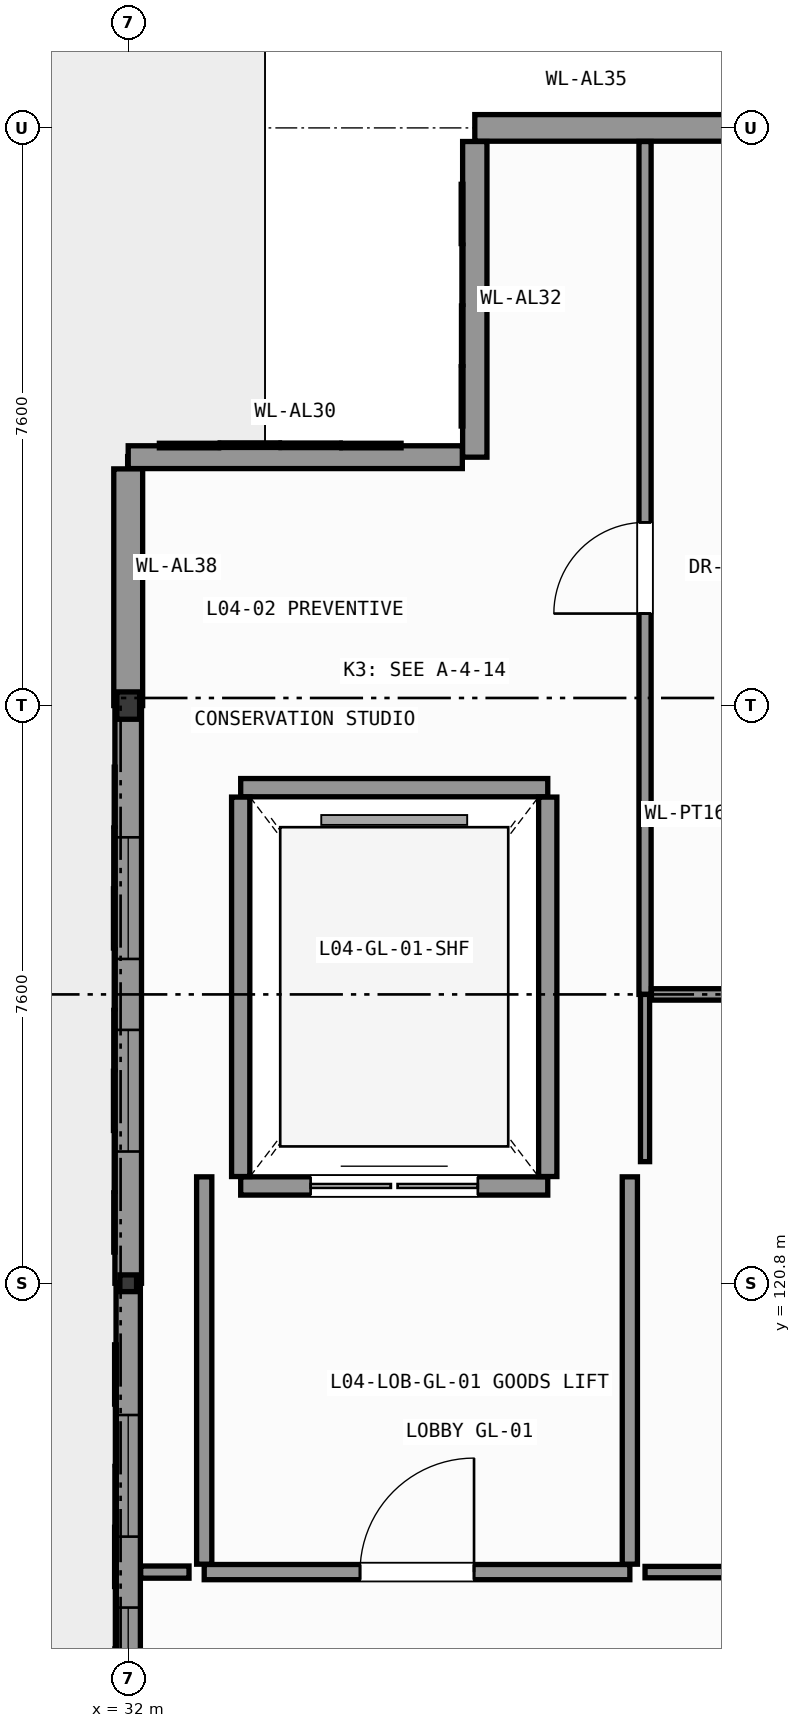
"""IFC4 building model, lengths in metres.
Left out: names, types, materials, properties, quantities, classifications, styles, units other than length and angle.
Written with IfcOpenShell. Run it as: python <this file> out.ifc"""

import sys

from ifc_helpers import new_model, si_unit, direction, frame, frame_2d, origin, origin_2d, place, context, subcontext, project, spatial, rectangle, hollow_rectangle, i_section, extrude, element, fill, save


model = new_model("IFC4")
c1 = context("Model", 3, precision=1e-05, world=origin(), true_north=direction((0.0, 1.0)))
c2 = subcontext(c1, "Body", "Model", "MODEL_VIEW")
j1 = project(units=[si_unit("LENGTHUNIT", "METRE"), si_unit("PLANEANGLEUNIT", "RADIAN")], contexts=[c1])
p1 = place(None, origin())
s1 = spatial("IfcSite", under=j1, at=p1, CompositionType="ELEMENT")
p2 = place(p1, origin())
s2 = spatial("IfcBuilding", under=s1, at=p2, CompositionType="ELEMENT")
p3 = place(p2, frame((0.0, 0.0, 18.0)))
s3 = spatial("IfcBuildingStorey", under=s2, at=p3, CompositionType="ELEMENT", Elevation=18.0)
p4 = place(p3, frame((32.0, 120.8, 0.0), z_axis=(0.0, 0.0, 1.0), x_axis=(1.0, 0.0, 0.0)))
e1 = element("IfcColumn", 1, at=p4, inside=s3, PredefinedType="COLUMN", context=c2, shape_type="SweptSolid", body=[
    extrude(hollow_rectangle(XDim=0.22, YDim=0.22, WallThickness=0.012, InnerFilletRadius=0.012, OuterFilletRadius=0.024, at=origin_2d()), origin(), (0.0, 0.0, 1.0), 4.2),
])
p5 = place(p3, frame((32.0, 128.4, 0.0), z_axis=(0.0, 0.0, 1.0), x_axis=(1.0, 0.0, 0.0)))
e2 = element("IfcColumn", 2, at=p5, inside=s3, PredefinedType="COLUMN", context=c2, shape_type="SweptSolid", body=[
    extrude(i_section(OverallWidth=0.3, OverallDepth=0.36, WebThickness=0.012, FlangeThickness=0.022, FilletRadius=0.027, at=origin_2d()), origin(), (0.0, 0.0, 1.0), 4.2),
])
p6 = place(p3, frame((36.56, 136.0, 0.0), z_axis=(0.0, 0.0, 1.0), x_axis=(1.0, 0.0, 0.0)))
e3 = element("IfcWall", 3, at=p6, inside=s3, PredefinedType="SOLIDWALL", context=c2, shape_type="SweptSolid", body=[
    extrude(rectangle(XDim=3.44, YDim=0.35, at=frame_2d((1.72, 0.0))), origin(), (0.0, 0.0, 1.0), 3.98),
])
p7 = place(p3, frame((36.56, 131.668, 0.0), z_axis=(0.0, 0.0, 1.0), x_axis=(0.0, 1.0, 0.0)))
e4 = element("IfcWall", 4, at=p7, inside=s3, PredefinedType="SOLIDWALL", context=c2, shape_type="SweptSolid", body=[
    extrude(rectangle(XDim=4.153, YDim=0.32, at=frame_2d((2.077, 0.0))), origin(), (0.0, 0.0, 1.0), 3.98),
])
p8 = place(p3, frame((32.0, 131.668, 0.0), z_axis=(0.0, 0.0, 1.0), x_axis=(1.0, 0.0, 0.0)))
e5 = element("IfcWall", 5, at=p8, inside=s3, PredefinedType="SOLIDWALL", context=c2, shape_type="SweptSolid", body=[
    extrude(rectangle(XDim=4.396, YDim=0.3, at=frame_2d((2.198, 0.0))), origin(), (0.0, 0.0, 1.0), 3.98),
])
p9 = place(p3, frame((32.0, 128.4, 0.0), z_axis=(0.0, 0.0, 1.0), x_axis=(0.0, 1.0, 0.0)))
e6 = element("IfcWall", 6, at=p9, inside=s3, PredefinedType="SOLIDWALL", context=c2, shape_type="SweptSolid", body=[
    extrude(rectangle(XDim=3.114, YDim=0.38, at=frame_2d((1.557, 0.0))), origin(), (0.0, 0.0, 1.0), 3.98),
])
p10 = place(p3, frame((32.0, 120.8, 0.0), z_axis=(0.0, 0.0, 1.0), x_axis=(0.0, 1.0, 0.0)))
e7 = element("IfcWall", 7, at=p10, inside=s3, PredefinedType="SOLIDWALL", context=c2, shape_type="SweptSolid", body=[
    extrude(rectangle(XDim=7.6, YDim=0.35, at=frame_2d((3.8, 0.0))), origin(), (0.0, 0.0, 1.0), 3.485),
])
p11 = place(p10, frame((1.733, 0.0, 0.95)))
e8 = element("IfcOpeningElement", 8, at=p11, cuts=e7, PredefinedType="OPENING", context=c2, shape_type="SweptSolid", body=[
    extrude(rectangle(XDim=1.6, YDim=2.13, at=frame_2d((0.8, 1.065))), frame((0.0, 0.185, 0.0), z_axis=(0.0, -1.0, 0.0), x_axis=(1.0, 0.0, 0.0)), (0.0, 0.0, 1.0), 0.37),
])
p12 = place(p10, frame((4.267, 0.0, 0.95)))
e9 = element("IfcOpeningElement", 9, at=p12, cuts=e7, PredefinedType="OPENING", context=c2, shape_type="SweptSolid", body=[
    extrude(rectangle(XDim=1.6, YDim=2.13, at=frame_2d((0.8, 1.065))), frame((0.0, 0.185, 0.0), z_axis=(0.0, -1.0, 0.0), x_axis=(1.0, 0.0, 0.0)), (0.0, 0.0, 1.0), 0.37),
])
p13 = place(p3, frame((32.0, 113.2, 0.0), z_axis=(0.0, 0.0, 1.0), x_axis=(0.0, 1.0, 0.0)))
e10 = element("IfcWall", 10, at=p13, inside=s3, PredefinedType="SOLIDWALL", context=c2, shape_type="SweptSolid", body=[
    extrude(rectangle(XDim=7.6, YDim=0.32, at=frame_2d((3.8, 0.0))), origin(), (0.0, 0.0, 1.0), 3.485),
])
p14 = place(p13, frame((1.733, 0.0, 0.95)))
e11 = element("IfcOpeningElement", 11, at=p14, cuts=e10, PredefinedType="OPENING", context=c2, shape_type="SweptSolid", body=[
    extrude(rectangle(XDim=1.6, YDim=2.13, at=frame_2d((0.8, 1.065))), frame((0.0, 0.17, 0.0), z_axis=(0.0, -1.0, 0.0), x_axis=(1.0, 0.0, 0.0)), (0.0, 0.0, 1.0), 0.34),
])
p15 = place(p13, frame((4.267, 0.0, 0.95)))
e12 = element("IfcOpeningElement", 12, at=p15, cuts=e10, PredefinedType="OPENING", context=c2, shape_type="SweptSolid", body=[
    extrude(rectangle(XDim=1.6, YDim=2.13, at=frame_2d((0.8, 1.065))), frame((0.0, 0.17, 0.0), z_axis=(0.0, -1.0, 0.0), x_axis=(1.0, 0.0, 0.0)), (0.0, 0.0, 1.0), 0.34),
])
p16 = place(p3, frame((33.48, 122.08, 0.0), z_axis=(0.0, 0.0, 1.0), x_axis=(1.0, 0.0, 0.0)))
e13 = element("IfcWall", 13, at=p16, inside=s3, PredefinedType="SHEAR", context=c2, shape_type="SweptSolid", body=[
    extrude(rectangle(XDim=4.04, YDim=0.24, at=frame_2d((2.02, 0.0))), origin(), (0.0, 0.0, 1.0), 3.98),
])
p17 = place(p16, frame((0.92, 0.0, 0.0)))
e14 = element("IfcOpeningElement", 14, at=p17, cuts=e13, PredefinedType="OPENING", context=c2, shape_type="SweptSolid", body=[
    extrude(rectangle(XDim=2.2, YDim=2.6, at=frame_2d((1.1, 1.3))), frame((0.0, 0.13, 0.0), z_axis=(0.0, -1.0, 0.0), x_axis=(1.0, 0.0, 0.0)), (0.0, 0.0, 1.0), 0.26),
])
p18 = place(p3, frame((33.48, 127.32, 0.0), z_axis=(0.0, 0.0, 1.0), x_axis=(1.0, 0.0, 0.0)))
e15 = element("IfcWall", 15, at=p18, inside=s3, PredefinedType="SHEAR", context=c2, shape_type="SweptSolid", body=[
    extrude(rectangle(XDim=4.04, YDim=0.24, at=frame_2d((2.02, 0.0))), origin(), (0.0, 0.0, 1.0), 3.98),
])
for number, where, z_axis, x_axis in (
    (16, (33.48, 122.204, 0.0), (0.0, 0.0, 1.0), (0.0, 1.0, 0.0)),
    (17, (37.52, 122.204, 0.0), (0.0, 0.0, 1.0), (0.0, 1.0, 0.0)),
):
    element("IfcWall", number, at=place(p3, frame(where, z_axis=z_axis, x_axis=x_axis)), inside=s3, PredefinedType="SHEAR", context=c2, shape_type="SweptSolid", body=[
        extrude(rectangle(XDim=4.992, YDim=0.24, at=frame_2d((2.496, 0.0))), origin(), (0.0, 0.0, 1.0), 3.98),
    ])
p19 = place(p3, frame((33.0, 117.0, 0.0), z_axis=(0.0, 0.0, 1.0), x_axis=(1.0, 0.0, 0.0)))
e18 = element("IfcWall", 18, at=p19, inside=s3, PredefinedType="PARTITIONING", context=c2, shape_type="SweptSolid", body=[
    extrude(rectangle(XDim=5.6, YDim=0.2, at=frame_2d((2.8, 0.0))), origin(), (0.0, 0.0, 1.0), 3.98),
])
p20 = place(p19, frame((2.05, 0.0, 0.0)))
e19 = element("IfcOpeningElement", 19, at=p20, cuts=e18, PredefinedType="OPENING", context=c2, shape_type="SweptSolid", body=[
    extrude(rectangle(XDim=1.5, YDim=2.2, at=frame_2d((0.75, 1.1))), frame((0.0, 0.11, 0.0), z_axis=(0.0, -1.0, 0.0), x_axis=(1.0, 0.0, 0.0)), (0.0, 0.0, 1.0), 0.22),
])
for number, where, z_axis, x_axis in (
    (20, (33.0, 117.104, 0.0), (0.0, 0.0, 1.0), (0.0, 1.0, 0.0)),
    (21, (38.6, 117.104, 0.0), (0.0, 0.0, 1.0), (0.0, 1.0, 0.0)),
):
    element("IfcWall", number, at=place(p3, frame(where, z_axis=z_axis, x_axis=x_axis)), inside=s3, PredefinedType="PARTITIONING", context=c2, shape_type="SweptSolid", body=[
        extrude(rectangle(XDim=5.096, YDim=0.2, at=frame_2d((2.548, 0.0))), origin(), (0.0, 0.0, 1.0), 3.98),
    ])
p21 = place(p3, frame((38.8, 124.6, 0.0), z_axis=(0.0, 0.0, 1.0), x_axis=(0.0, 1.0, 0.0)))
e22 = element("IfcWall", 22, at=p21, inside=s3, PredefinedType="PARTITIONING", context=c2, shape_type="SweptSolid", body=[
    extrude(rectangle(XDim=11.221, YDim=0.16, at=frame_2d((5.61, 0.0))), origin(), (0.0, 0.0, 1.0), 3.98),
])
p22 = place(p21, frame((5.01, 0.0, 0.0)))
e23 = element("IfcOpeningElement", 23, at=p22, cuts=e22, PredefinedType="OPENING", context=c2, shape_type="SweptSolid", body=[
    extrude(rectangle(XDim=1.2, YDim=2.2, at=frame_2d((0.6, 1.1))), frame((0.0, 0.09, 0.0), z_axis=(0.0, -1.0, 0.0), x_axis=(1.0, 0.0, 0.0)), (0.0, 0.0, 1.0), 0.18),
])
p23 = place(p3, frame((38.884, 124.6, 0.0), z_axis=(0.0, 0.0, 1.0), x_axis=(1.0, 0.0, 0.0)))
e24 = element("IfcWall", 24, at=p23, inside=s3, PredefinedType="PARTITIONING", context=c2, shape_type="SweptSolid", body=[
    extrude(rectangle(XDim=16.937, YDim=0.15, at=frame_2d((8.469, 0.0))), origin(), (0.0, 0.0, 1.0), 3.98),
])
p24 = place(p23, frame((7.993, 0.0, 0.0)))
e25 = element("IfcOpeningElement", 25, at=p24, cuts=e24, PredefinedType="OPENING", context=c2, shape_type="SweptSolid", body=[
    extrude(rectangle(XDim=0.95, YDim=2.1, at=frame_2d((0.475, 1.05))), frame((0.0, 0.085, 0.0), z_axis=(0.0, -1.0, 0.0), x_axis=(1.0, 0.0, 0.0)), (0.0, 0.0, 1.0), 0.17),
])
p25 = place(p3, frame((38.8, 122.4, 0.0), z_axis=(0.0, 0.0, 1.0), x_axis=(0.0, 1.0, 0.0)))
e26 = element("IfcWall", 26, at=p25, inside=s3, PredefinedType="PARTITIONING", context=c2, shape_type="SweptSolid", body=[
    extrude(rectangle(XDim=2.2, YDim=0.12, at=frame_2d((1.1, 0.0))), origin(), (0.0, 0.0, 1.0), 3.98),
])
p26 = place(p3, frame((32.164, 117.0, 0.0), z_axis=(0.0, 0.0, 1.0), x_axis=(1.0, 0.0, 0.0)))
e27 = element("IfcWall", 27, at=p26, inside=s3, PredefinedType="PARTITIONING", context=c2, shape_type="SweptSolid", body=[
    extrude(rectangle(XDim=0.636, YDim=0.16, at=frame_2d((0.318, 0.0))), origin(), (0.0, 0.0, 1.0), 3.98),
])
p27 = place(p3, frame((38.8, 117.0, 0.0), z_axis=(0.0, 0.0, 1.0), x_axis=(1.0, 0.0, 0.0)))
e28 = element("IfcWall", 28, at=p27, inside=s3, PredefinedType="PARTITIONING", context=c2, shape_type="SweptSolid", body=[
    extrude(rectangle(XDim=9.446, YDim=0.15, at=frame_2d((4.723, 0.0))), origin(), (0.0, 0.0, 1.0), 3.98),
])
p28 = place(p27, frame((4.198, 0.0, 0.0)))
e29 = element("IfcOpeningElement", 29, at=p28, cuts=e28, PredefinedType="OPENING", context=c2, shape_type="SweptSolid", body=[
    extrude(rectangle(XDim=1.05, YDim=2.2, at=frame_2d((0.525, 1.1))), frame((0.0, 0.085, 0.0), z_axis=(0.0, -1.0, 0.0), x_axis=(1.0, 0.0, 0.0)), (0.0, 0.0, 1.0), 0.17),
])
p29 = place(p11, origin())
e30 = element("IfcWindow", 30, at=p29, inside=s3, PartitioningType="SINGLE_PANEL", PredefinedType="WINDOW", context=c2, shape_type="SweptSolid", body=[
    extrude(rectangle(XDim=1.6, YDim=2.13, at=frame_2d((0.8, 1.065))), frame((0.0, 0.03, 0.0), z_axis=(0.0, -1.0, 0.0), x_axis=(1.0, 0.0, 0.0)), (0.0, 0.0, 1.0), 0.06),
])
fill(e8, e30)
p30 = place(p12, origin())
e31 = element("IfcWindow", 31, at=p30, inside=s3, PartitioningType="SINGLE_PANEL", PredefinedType="WINDOW", context=c2, shape_type="SweptSolid", body=[
    extrude(rectangle(XDim=1.6, YDim=2.13, at=frame_2d((0.8, 1.065))), frame((0.0, 0.03, 0.0), z_axis=(0.0, -1.0, 0.0), x_axis=(1.0, 0.0, 0.0)), (0.0, 0.0, 1.0), 0.06),
])
fill(e9, e31)
p31 = place(p14, origin())
e32 = element("IfcWindow", 32, at=p31, inside=s3, PartitioningType="SINGLE_PANEL", PredefinedType="WINDOW", context=c2, shape_type="SweptSolid", body=[
    extrude(rectangle(XDim=1.6, YDim=2.13, at=frame_2d((0.8, 1.065))), frame((0.0, 0.03, 0.0), z_axis=(0.0, -1.0, 0.0), x_axis=(1.0, 0.0, 0.0)), (0.0, 0.0, 1.0), 0.06),
])
fill(e11, e32)
p32 = place(p15, origin())
e33 = element("IfcWindow", 33, at=p32, inside=s3, PartitioningType="SINGLE_PANEL", PredefinedType="WINDOW", context=c2, shape_type="SweptSolid", body=[
    extrude(rectangle(XDim=1.6, YDim=2.13, at=frame_2d((0.8, 1.065))), frame((0.0, 0.03, 0.0), z_axis=(0.0, -1.0, 0.0), x_axis=(1.0, 0.0, 0.0)), (0.0, 0.0, 1.0), 0.06),
])
fill(e12, e33)
p33 = place(p17, origin())
e34 = element("IfcDoor", 34, at=p33, inside=s3, OperationType="DOUBLE_DOOR_SLIDING", PredefinedType="DOOR", context=c2, shape_type="SweptSolid", body=[
    extrude(rectangle(XDim=2.2, YDim=2.6, at=frame_2d((1.1, 1.3))), frame((0.0, 0.025, 0.0), z_axis=(0.0, -1.0, 0.0), x_axis=(1.0, 0.0, 0.0)), (0.0, 0.0, 1.0), 0.05),
])
fill(e14, e34)
p34 = place(p20, origin())
e35 = element("IfcDoor", 35, at=p34, inside=s3, OperationType="SINGLE_SWING_RIGHT", PredefinedType="DOOR", context=c2, shape_type="SweptSolid", body=[
    extrude(rectangle(XDim=1.5, YDim=2.2, at=frame_2d((0.75, 1.1))), frame((0.0, 0.025, 0.0), z_axis=(0.0, -1.0, 0.0), x_axis=(1.0, 0.0, 0.0)), (0.0, 0.0, 1.0), 0.05),
])
fill(e19, e35)
p35 = place(p22, origin())
e36 = element("IfcDoor", 36, at=p35, inside=s3, OperationType="SINGLE_SWING_LEFT", PredefinedType="DOOR", context=c2, shape_type="SweptSolid", body=[
    extrude(rectangle(XDim=1.2, YDim=2.2, at=frame_2d((0.6, 1.1))), frame((0.0, 0.025, 0.0), z_axis=(0.0, -1.0, 0.0), x_axis=(1.0, 0.0, 0.0)), (0.0, 0.0, 1.0), 0.05),
])
fill(e23, e36)
save(model, sys.argv[1])
